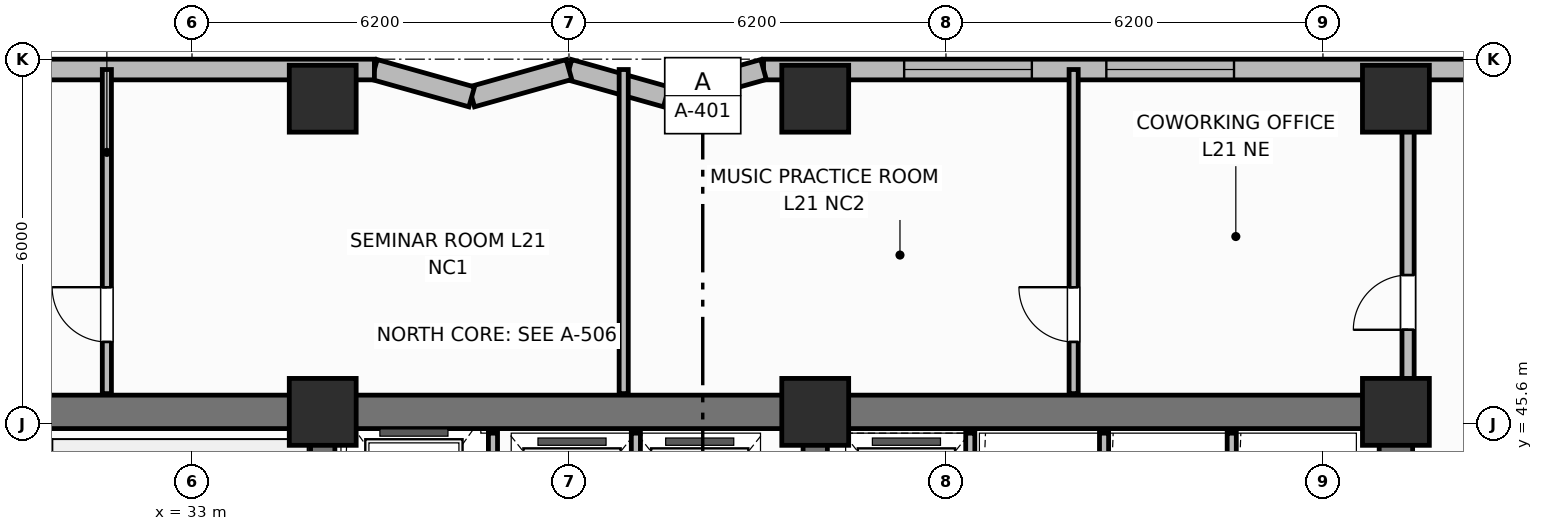
"""IFC4 building model, lengths in metres.
Left out: names, types, materials, properties, quantities, classifications, styles, units other than length and angle.
Written with IfcOpenShell. Run it as: python <this file> out.ifc"""

import sys

from ifc_helpers import new_model, si_unit, direction, frame, frame_2d, origin, origin_2d, place, context, subcontext, project, spatial, rectangle, extrude, element, fill, save


model = new_model("IFC4")
c1 = context("Model", 3, precision=1e-05, world=origin(), true_north=direction((0.0, 1.0)))
c2 = subcontext(c1, "Body", "Model", "MODEL_VIEW")
j1 = project(units=[si_unit("LENGTHUNIT", "METRE"), si_unit("PLANEANGLEUNIT", "RADIAN")], contexts=[c1])
p1 = place(None, origin())
s1 = spatial("IfcSite", under=j1, at=p1, CompositionType="ELEMENT")
p2 = place(p1, origin())
s2 = spatial("IfcBuilding", under=s1, at=p2, CompositionType="ELEMENT")
p3 = place(p2, frame((0.0, 0.0, 88.3)))
s3 = spatial("IfcBuildingStorey", under=s2, at=p3, CompositionType="ELEMENT", Elevation=88.3)
p4 = place(p3, frame((25.6, 45.8, 0.0), z_axis=(0.0, 0.0, 1.0), x_axis=(1.0, 0.0, 0.0)))
e1 = element("IfcWall", 1, at=p4, inside=s3, PredefinedType="SHEAR", context=c2, shape_type="SweptSolid", body=[
    extrude(rectangle(XDim=27.2, YDim=0.55, at=frame_2d((13.6, 0.0))), origin(), (0.0, 0.0, 1.0), 3.7),
])
p5 = place(p3, frame((52.8, 39.875, 0.0), z_axis=(0.0, 0.0, 1.0), x_axis=(0.0, 1.0, 0.0)))
e2 = element("IfcWall", 2, at=p5, inside=s3, PredefinedType="SHEAR", context=c2, shape_type="SweptSolid", body=[
    extrude(rectangle(XDim=5.65, YDim=0.55, at=frame_2d((2.825, 0.0))), origin(), (0.0, 0.0, 1.0), 3.7),
])
for number, where, z_axis, x_axis in (
    (3, (35.15, 39.875, 0.0), (0.0, 0.0, 1.0), (0.0, 1.0, 0.0)),
    (4, (43.25, 39.875, 0.0), (0.0, 0.0, 1.0), (0.0, 1.0, 0.0)),
):
    element("IfcWall", number, at=place(p3, frame(where, z_axis=z_axis, x_axis=x_axis)), inside=s3, PredefinedType="SHEAR", context=c2, shape_type="SweptSolid", body=[
        extrude(rectangle(XDim=5.65, YDim=0.4, at=frame_2d((2.825, 0.0))), origin(), (0.0, 0.0, 1.0), 3.7),
    ])
for number, where, z_axis, x_axis in (
    (5, (35.15, 45.8, 0.0), (0.0, 0.0, 1.0), (1.0, 0.0, 0.0)),
    (6, (43.25, 45.8, 0.0), (0.0, 0.0, 1.0), (1.0, 0.0, 0.0)),
    (7, (52.8, 45.8, 0.0), (0.0, 0.0, 1.0), (1.0, 0.0, 0.0)),
    (8, (35.15, 50.95, 0.0), (0.0, 0.0, 1.0), (1.0, 0.0, 0.0)),
    (9, (43.25, 50.95, 0.0), (0.0, 0.0, 1.0), (1.0, 0.0, 0.0)),
    (10, (52.8, 50.95, 0.0), (0.0, 0.0, 1.0), (1.0, 0.0, 0.0)),
):
    element("IfcColumn", number, at=place(p3, frame(where, z_axis=z_axis, x_axis=x_axis)), inside=s3, PredefinedType="COLUMN", context=c2, shape_type="SweptSolid", body=[
        extrude(rectangle(XDim=1.1, YDim=1.1, at=origin_2d()), origin(), (0.0, 0.0, 1.0), 3.7),
    ])
p6 = place(p3, frame((59.8, 51.43, 0.0), z_axis=(0.0, 0.0, 1.0), x_axis=(-1.0, 0.0, 0.0)))
e11 = element("IfcWall", 11, at=p6, inside=s3, PredefinedType="SOLIDWALL", context=c2, shape_type="SweptSolid", body=[
    extrude(rectangle(XDim=17.4, YDim=0.34, at=frame_2d((8.7, 0.0))), origin(), (0.0, 0.0, 1.0), 2.7),
])
p7 = place(p6, frame((1.613, 0.0, 0.68)))
e12 = element("IfcOpeningElement", 12, at=p7, cuts=e11, PredefinedType="OPENING", context=c2, shape_type="SweptSolid", body=[
    extrude(rectangle(XDim=2.1, YDim=1.9, at=frame_2d((1.05, 0.95))), frame((0.0, 0.18, 0.0), z_axis=(0.0, -1.0, 0.0), x_axis=(1.0, 0.0, 0.0)), (0.0, 0.0, 1.0), 0.36),
])
p8 = place(p6, frame((9.663, 0.0, 0.68)))
e13 = element("IfcOpeningElement", 13, at=p8, cuts=e11, PredefinedType="OPENING", context=c2, shape_type="SweptSolid", body=[
    extrude(rectangle(XDim=2.1, YDim=1.9, at=frame_2d((1.05, 0.95))), frame((0.0, 0.18, 0.0), z_axis=(0.0, -1.0, 0.0), x_axis=(1.0, 0.0, 0.0)), (0.0, 0.0, 1.0), 0.36),
])
p9 = place(p6, frame((12.988, 0.0, 0.68)))
e14 = element("IfcOpeningElement", 14, at=p9, cuts=e11, PredefinedType="OPENING", context=c2, shape_type="SweptSolid", body=[
    extrude(rectangle(XDim=2.1, YDim=1.9, at=frame_2d((1.05, 0.95))), frame((0.0, 0.18, 0.0), z_axis=(0.0, -1.0, 0.0), x_axis=(1.0, 0.0, 0.0)), (0.0, 0.0, 1.0), 0.36),
])
p10 = place(p3, frame((42.4, 51.43, 0.0), z_axis=(0.0, 0.0, 1.0), x_axis=(-0.962652136636, -0.270741322725, 0.0)))
e15 = element("IfcWall", 15, at=p10, inside=s3, PredefinedType="SOLIDWALL", context=c2, shape_type="SweptSolid", body=[
    extrude(rectangle(XDim=1.662, YDim=0.34, at=frame_2d((0.831, 0.0))), origin(), (0.0, 0.0, 1.0), 2.7),
])
p11 = place(p3, frame((40.8, 50.98, 0.0), z_axis=(0.0, 0.0, 1.0), x_axis=(-0.962662902433, 0.270703040766, 0.0)))
e16 = element("IfcWall", 16, at=p11, inside=s3, PredefinedType="SOLIDWALL", context=c2, shape_type="SweptSolid", body=[
    extrude(rectangle(XDim=1.662, YDim=0.34, at=frame_2d((0.831, 0.0))), origin(), (0.0, 0.0, 1.0), 2.7),
])
p12 = place(p3, frame((39.2, 51.43, 0.0), z_axis=(0.0, 0.0, 1.0), x_axis=(-0.962652136636, -0.270741322725, 0.0)))
e17 = element("IfcWall", 17, at=p12, inside=s3, PredefinedType="SOLIDWALL", context=c2, shape_type="SweptSolid", body=[
    extrude(rectangle(XDim=1.662, YDim=0.34, at=frame_2d((0.831, 0.0))), origin(), (0.0, 0.0, 1.0), 2.7),
])
p13 = place(p3, frame((37.6, 50.98, 0.0), z_axis=(0.0, 0.0, 1.0), x_axis=(-0.962662902433, 0.270703040766, 0.0)))
e18 = element("IfcWall", 18, at=p13, inside=s3, PredefinedType="SOLIDWALL", context=c2, shape_type="SweptSolid", body=[
    extrude(rectangle(XDim=1.662, YDim=0.34, at=frame_2d((0.831, 0.0))), origin(), (0.0, 0.0, 1.0), 2.7),
])
p14 = place(p3, frame((36.0, 51.43, 0.0), z_axis=(0.0, 0.0, 1.0), x_axis=(-1.0, 0.0, 0.0)))
e19 = element("IfcWall", 19, at=p14, inside=s3, PredefinedType="SOLIDWALL", context=c2, shape_type="SweptSolid", body=[
    extrude(rectangle(XDim=17.4, YDim=0.34, at=frame_2d((8.7, 0.0))), origin(), (0.0, 0.0, 1.0), 2.7),
])
p15 = place(p14, frame((5.637, 0.0, 0.68)))
e20 = element("IfcOpeningElement", 20, at=p15, cuts=e19, PredefinedType="OPENING", context=c2, shape_type="SweptSolid", body=[
    extrude(rectangle(XDim=2.1, YDim=1.9, at=frame_2d((1.05, 0.95))), frame((0.0, 0.18, 0.0), z_axis=(0.0, -1.0, 0.0), x_axis=(1.0, 0.0, 0.0)), (0.0, 0.0, 1.0), 0.36),
])
p16 = place(p14, frame((13.688, 0.0, 0.68)))
e21 = element("IfcOpeningElement", 21, at=p16, cuts=e19, PredefinedType="OPENING", context=c2, shape_type="SweptSolid", body=[
    extrude(rectangle(XDim=2.1, YDim=1.9, at=frame_2d((1.05, 0.95))), frame((0.0, 0.18, 0.0), z_axis=(0.0, -1.0, 0.0), x_axis=(1.0, 0.0, 0.0)), (0.0, 0.0, 1.0), 0.36),
])
p17 = place(p3, frame((37.95, 42.6, 0.0), z_axis=(0.0, 0.0, 1.0), x_axis=(0.0, 1.0, 0.0)))
e22 = element("IfcWall", 22, at=p17, inside=s3, PredefinedType="PARTITIONING", context=c2, shape_type="SweptSolid", body=[
    extrude(rectangle(XDim=2.85, YDim=0.15, at=frame_2d((1.425, 0.0))), origin(), (0.0, 0.0, 1.0), 2.53),
])
for number, where, z_axis, x_axis in (
    (23, (40.3, 42.65, 0.0), (0.0, 0.0, 1.0), (0.0, 1.0, 0.0)),
    (24, (45.8, 42.65, 0.0), (0.0, 0.0, 1.0), (0.0, 1.0, 0.0)),
    (25, (48.0, 42.65, 0.0), (0.0, 0.0, 1.0), (0.0, 1.0, 0.0)),
    (26, (50.1, 42.65, 0.0), (0.0, 0.0, 1.0), (0.0, 1.0, 0.0)),
):
    element("IfcWall", number, at=place(p3, frame(where, z_axis=z_axis, x_axis=x_axis)), inside=s3, PredefinedType="PARTITIONING", context=c2, shape_type="SweptSolid", body=[
        extrude(rectangle(XDim=2.8, YDim=0.15, at=frame_2d((1.4, 0.0))), origin(), (0.0, 0.0, 1.0), 2.53),
    ])
p18 = place(p3, frame((31.6, 46.1, 0.0), z_axis=(0.0, 0.0, 1.0), x_axis=(0.0, 1.0, 0.0)))
e27 = element("IfcWall", 27, at=p18, inside=s3, PredefinedType="PARTITIONING", context=c2, shape_type="SweptSolid", body=[
    extrude(rectangle(XDim=5.33, YDim=0.15, at=frame_2d((2.665, 0.0))), origin(), (0.0, 0.0, 1.0), 2.53),
])
p19 = place(p18, frame((0.85, 0.0, 0.0)))
e28 = element("IfcOpeningElement", 28, at=p19, cuts=e27, PredefinedType="OPENING", context=c2, shape_type="SweptSolid", body=[
    extrude(rectangle(XDim=0.9, YDim=2.1, at=frame_2d((0.45, 1.05))), frame((0.0, 0.085, 0.0), z_axis=(0.0, -1.0, 0.0), x_axis=(1.0, 0.0, 0.0)), (0.0, 0.0, 1.0), 0.17),
])
p20 = place(p3, frame((40.1, 46.1, 0.0), z_axis=(0.0, 0.0, 1.0), x_axis=(0.0, 1.0, 0.0)))
e29 = element("IfcWall", 29, at=p20, inside=s3, PredefinedType="PARTITIONING", context=c2, shape_type="SweptSolid", body=[
    extrude(rectangle(XDim=5.33, YDim=0.15, at=frame_2d((2.665, 0.0))), origin(), (0.0, 0.0, 1.0), 2.53),
])
p21 = place(p3, frame((47.5, 46.1, 0.0), z_axis=(0.0, 0.0, 1.0), x_axis=(0.0, 1.0, 0.0)))
e30 = element("IfcWall", 30, at=p21, inside=s3, PredefinedType="PARTITIONING", context=c2, shape_type="SweptSolid", body=[
    extrude(rectangle(XDim=5.33, YDim=0.15, at=frame_2d((2.665, 0.0))), origin(), (0.0, 0.0, 1.0), 2.53),
])
p22 = place(p21, frame((0.85, 0.0, 0.0)))
e31 = element("IfcOpeningElement", 31, at=p22, cuts=e30, PredefinedType="OPENING", context=c2, shape_type="SweptSolid", body=[
    extrude(rectangle(XDim=0.9, YDim=2.1, at=frame_2d((0.45, 1.05))), frame((0.0, 0.085, 0.0), z_axis=(0.0, -1.0, 0.0), x_axis=(1.0, 0.0, 0.0)), (0.0, 0.0, 1.0), 0.17),
])
p23 = place(p3, frame((53.0, 46.1, 0.0), z_axis=(0.0, 0.0, 1.0), x_axis=(0.0, 1.0, 0.0)))
e32 = element("IfcWall", 32, at=p23, inside=s3, PredefinedType="PARTITIONING", context=c2, shape_type="SweptSolid", body=[
    extrude(rectangle(XDim=4.68, YDim=0.2, at=frame_2d((2.34, 0.0))), origin(), (0.0, 0.0, 1.0), 2.53),
])
p24 = place(p23, frame((1.05, 0.0, 0.0)))
e33 = element("IfcOpeningElement", 33, at=p24, cuts=e32, PredefinedType="OPENING", context=c2, shape_type="SweptSolid", body=[
    extrude(rectangle(XDim=0.9, YDim=2.1, at=frame_2d((0.45, 1.05))), frame((0.0, 0.11, 0.0), z_axis=(0.0, -1.0, 0.0), x_axis=(1.0, 0.0, 0.0)), (0.0, 0.0, 1.0), 0.22),
])
p25 = place(p8, origin())
e34 = element("IfcWindow", 34, at=p25, inside=s3, PartitioningType="SINGLE_PANEL", PredefinedType="WINDOW", context=c2, shape_type="SweptSolid", body=[
    extrude(rectangle(XDim=2.1, YDim=1.9, at=frame_2d((1.05, 0.95))), frame((0.0, 0.03, 0.0), z_axis=(0.0, -1.0, 0.0), x_axis=(1.0, 0.0, 0.0)), (0.0, 0.0, 1.0), 0.06),
])
fill(e13, e34)
p26 = place(p9, origin())
e35 = element("IfcWindow", 35, at=p26, inside=s3, PartitioningType="SINGLE_PANEL", PredefinedType="WINDOW", context=c2, shape_type="SweptSolid", body=[
    extrude(rectangle(XDim=2.1, YDim=1.9, at=frame_2d((1.05, 0.95))), frame((0.0, 0.03, 0.0), z_axis=(0.0, -1.0, 0.0), x_axis=(1.0, 0.0, 0.0)), (0.0, 0.0, 1.0), 0.06),
])
fill(e14, e35)
p27 = place(p19, origin())
e36 = element("IfcDoor", 36, at=p27, inside=s3, OperationType="SINGLE_SWING_RIGHT", PredefinedType="DOOR", context=c2, shape_type="SweptSolid", body=[
    extrude(rectangle(XDim=0.9, YDim=2.1, at=frame_2d((0.45, 1.05))), frame((0.0, 0.025, 0.0), z_axis=(0.0, -1.0, 0.0), x_axis=(1.0, 0.0, 0.0)), (0.0, 0.0, 1.0), 0.05),
])
fill(e28, e36)
p28 = place(p22, origin())
e37 = element("IfcDoor", 37, at=p28, inside=s3, OperationType="SINGLE_SWING_RIGHT", PredefinedType="DOOR", context=c2, shape_type="SweptSolid", body=[
    extrude(rectangle(XDim=0.9, YDim=2.1, at=frame_2d((0.45, 1.05))), frame((0.0, 0.025, 0.0), z_axis=(0.0, -1.0, 0.0), x_axis=(1.0, 0.0, 0.0)), (0.0, 0.0, 1.0), 0.05),
])
fill(e31, e37)
p29 = place(p24, origin())
e38 = element("IfcDoor", 38, at=p29, inside=s3, OperationType="SINGLE_SWING_LEFT", PredefinedType="DOOR", context=c2, shape_type="SweptSolid", body=[
    extrude(rectangle(XDim=0.9, YDim=2.1, at=frame_2d((0.45, 1.05))), frame((0.0, 0.025, 0.0), z_axis=(0.0, -1.0, 0.0), x_axis=(1.0, 0.0, 0.0)), (0.0, 0.0, 1.0), 0.05),
])
fill(e33, e38)
save(model, sys.argv[1])
